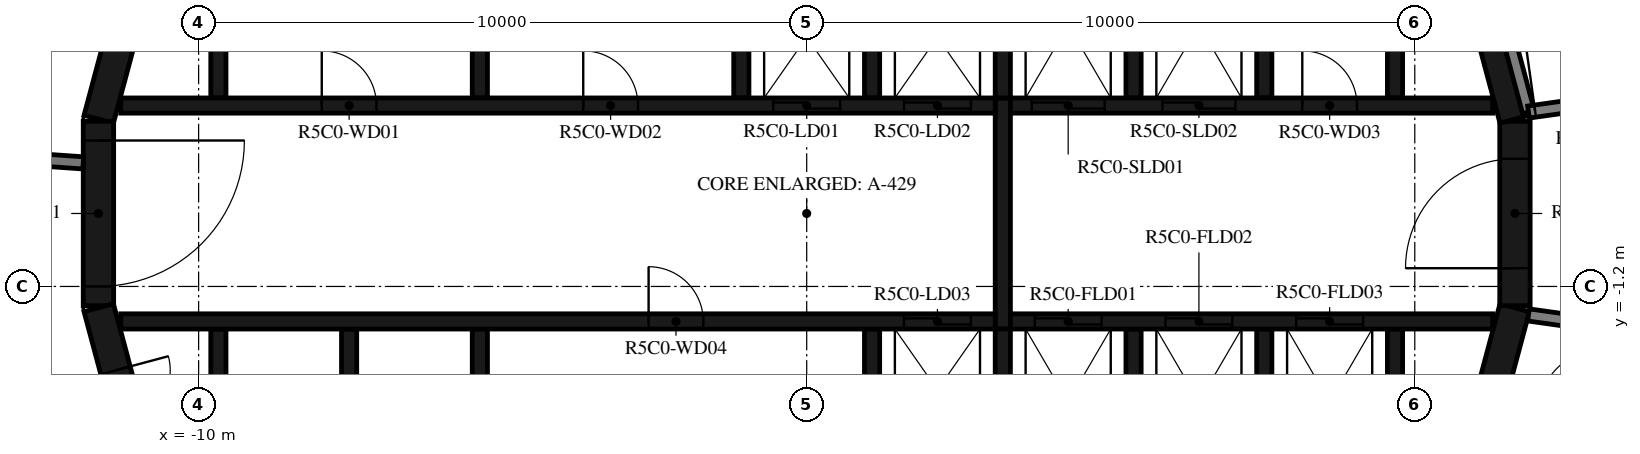
"""IFC4 building model, lengths in metres.
Left out: names, types, materials, properties, quantities, classifications, styles, units other than length and angle.
Written with IfcOpenShell. Run it as: python <this file> out.ifc"""

import sys

from ifc_helpers import new_model, si_unit, direction, frame, frame_2d, origin, place, context, subcontext, project, spatial, polyline, rectangle, outline, extrude, element, fill, save


model = new_model("IFC4")
c1 = context("Model", 3, precision=1e-05, world=origin(), true_north=direction((0.0, 1.0)))
c2 = subcontext(c1, "Body", "Model", "MODEL_VIEW")
j1 = project(units=[si_unit("LENGTHUNIT", "METRE"), si_unit("PLANEANGLEUNIT", "RADIAN")], contexts=[c1])
p1 = place(None, origin())
s1 = spatial("IfcSite", under=j1, at=p1, CompositionType="ELEMENT")
p2 = place(p1, origin())
s2 = spatial("IfcBuilding", under=s1, at=p2, CompositionType="ELEMENT")
p3 = place(p2, frame((0.0, 0.0, 216.4)))
s3 = spatial("IfcBuildingStorey", under=s2, at=p3, CompositionType="ELEMENT", Elevation=216.4)
p4 = place(p3, frame((10.858, -4.479, 0.0), z_axis=(0.0, 0.0, 1.0), x_axis=(0.258734743916, 0.965948410781, 0.0)))
e1 = element("IfcWall", 1, at=p4, inside=s3, PredefinedType="SHEAR", context=c2, shape_type="SweptSolid", body=[
    extrude(rectangle(XDim=3.033, YDim=0.5, at=frame_2d((1.516, 0.0))), origin(), (0.0, 0.0, 1.0), 3.05),
])
p5 = place(p3, frame((11.647, -1.516, 0.0), z_axis=(0.0, 0.0, 1.0), x_axis=(0.0, 1.0, 0.0)))
e2 = element("IfcWall", 2, at=p5, inside=s3, PredefinedType="SHEAR", context=c2, shape_type="SweptSolid", body=[
    extrude(rectangle(XDim=3.033, YDim=0.5, at=frame_2d((1.516, 0.0))), origin(), (0.0, 0.0, 1.0), 3.05),
])
p6 = place(p5, frame((0.616, 0.0, 0.0)))
e3 = element("IfcOpeningElement", 3, at=p6, cuts=e2, PredefinedType="OPENING", context=c2, shape_type="SweptSolid", body=[
    extrude(rectangle(XDim=1.8, YDim=2.1, at=frame_2d((0.9, 1.05))), frame((0.0, 0.26, 0.0), z_axis=(0.0, -1.0, 0.0), x_axis=(1.0, 0.0, 0.0)), (0.0, 0.0, 1.0), 0.52),
])
for number, where, z_axis, x_axis in (
    (4, (11.643, 1.55, 0.0), (0.0, 0.0, 1.0), (-0.259, 0.966, 0.0)),
    (5, (-10.858, 4.479, 0.0), (0.0, 0.0, 1.0), (-0.259, -0.966, 0.0)),
):
    element("IfcWall", number, at=place(p3, frame(where, z_axis=z_axis, x_axis=x_axis)), inside=s3, PredefinedType="SHEAR", context=c2, shape_type="SweptSolid", body=[
        extrude(rectangle(XDim=3.033, YDim=0.5, at=frame_2d((1.516, 0.0))), origin(), (0.0, 0.0, 1.0), 3.05),
    ])
p7 = place(p3, frame((-11.647, 1.516, 0.0), z_axis=(0.0, 0.0, 1.0), x_axis=(0.0, -1.0, 0.0)))
e6 = element("IfcWall", 6, at=p7, inside=s3, PredefinedType="SHEAR", context=c2, shape_type="SweptSolid", body=[
    extrude(rectangle(XDim=3.033, YDim=0.5, at=frame_2d((1.516, 0.0))), origin(), (0.0, 0.0, 1.0), 3.05),
])
p8 = place(p7, frame((0.316, 0.0, 0.0)))
e7 = element("IfcOpeningElement", 7, at=p8, cuts=e6, PredefinedType="OPENING", context=c2, shape_type="SweptSolid", body=[
    extrude(rectangle(XDim=2.4, YDim=2.1, at=frame_2d((1.2, 1.05))), frame((0.0, 0.26, 0.0), z_axis=(0.0, -1.0, 0.0), x_axis=(1.0, 0.0, 0.0)), (0.0, 0.0, 1.0), 0.52),
])
p9 = place(p3, frame((-11.643, -1.55, 0.0), z_axis=(0.0, 0.0, 1.0), x_axis=(0.258734743916, -0.965948410781, 0.0)))
e8 = element("IfcWall", 8, at=p9, inside=s3, PredefinedType="SHEAR", context=c2, shape_type="SweptSolid", body=[
    extrude(rectangle(XDim=3.033, YDim=0.5, at=frame_2d((1.516, 0.0))), origin(), (0.0, 0.0, 1.0), 3.05),
])
p10 = place(p9, frame((1.066, 0.0, 0.0)))
e9 = element("IfcOpeningElement", 9, at=p10, cuts=e8, PredefinedType="OPENING", context=c2, shape_type="SweptSolid", body=[
    extrude(rectangle(XDim=0.9, YDim=2.1, at=frame_2d((0.45, 1.05))), frame((0.0, 0.26, 0.0), z_axis=(0.0, -1.0, 0.0), x_axis=(1.0, 0.0, 0.0)), (0.0, 0.0, 1.0), 0.52),
])
p11 = place(p3, origin())
e10 = element("IfcWall", 10, at=p11, inside=s3, PredefinedType="SHEAR", context=c2, shape_type="SweptSolid", body=[
    extrude(outline(polyline([(-9.55, 4.8), (-5.5, 4.8), (-5.5, 1.9), (-5.25, 1.9), (-5.25, 4.8), (-1.2, 4.8), (-1.2, 1.9), (-0.95, 1.9), (-0.95, 4.8), (0.95, 4.8), (0.95, 1.9), (1.2, 1.9), (1.2, 4.8), (3.1, 4.8), (3.1, 1.9), (3.35, 1.9), (3.35, 4.8), (5.25, 4.8), (5.25, 1.9), (5.5, 1.9), (5.5, 4.8), (7.4, 4.8), (7.4, 1.9), (7.65, 1.9), (7.65, 4.8), (9.55, 4.8), (9.55, 1.9), (9.8, 1.9), (9.8, 4.8), (9.8, 5.05), (-9.8, 5.05), (-9.8, 4.8), (-9.8, 1.9), (-9.55, 1.9), (-9.55, 4.8)])), origin(), (0.0, 0.0, 1.0), 3.05),
])
p12 = place(p3, origin())
e11 = element("IfcWall", 11, at=p12, inside=s3, PredefinedType="SHEAR", context=c2, shape_type="SweptSolid", body=[
    extrude(outline(polyline([(9.8, -5.05), (9.8, -4.8), (9.8, -1.9), (9.55, -1.9), (9.55, -4.8), (7.65, -4.8), (7.65, -1.9), (7.4, -1.9), (7.4, -4.8), (5.5, -4.8), (5.5, -1.9), (5.25, -1.9), (5.25, -4.8), (3.35, -4.8), (3.35, -1.9), (3.1, -1.9), (3.1, -4.8), (1.2, -4.8), (1.2, -1.9), (0.95, -1.9), (0.95, -4.8), (-5.25, -4.8), (-5.25, -1.9), (-5.5, -1.9), (-5.5, -4.8), (-7.4, -4.8), (-7.4, -1.9), (-7.65, -1.9), (-7.65, -4.8), (-9.55, -4.8), (-9.55, -1.9), (-9.8, -1.9), (-9.8, -4.8), (-9.8, -5.05), (9.8, -5.05)])), origin(), (0.0, 0.0, 1.0), 3.05),
])
p13 = place(p3, frame((-11.28, 1.775, 0.0), z_axis=(0.0, 0.0, 1.0), x_axis=(1.0, 0.0, 0.0)))
e12 = element("IfcWall", 12, at=p13, inside=s3, PredefinedType="SHEAR", context=c2, shape_type="SweptSolid", body=[
    extrude(rectangle(XDim=14.38, YDim=0.25, at=frame_2d((7.19, 0.0))), origin(), (0.0, 0.0, 1.0), 3.05),
])
p14 = place(p13, frame((10.73, 0.0, 0.0)))
e13 = element("IfcOpeningElement", 13, at=p14, cuts=e12, PredefinedType="OPENING", context=c2, shape_type="SweptSolid", body=[
    extrude(rectangle(XDim=1.1, YDim=2.1, at=frame_2d((0.55, 1.05))), frame((0.0, 0.135, 0.0), z_axis=(0.0, -1.0, 0.0), x_axis=(1.0, 0.0, 0.0)), (0.0, 0.0, 1.0), 0.27),
])
p15 = place(p13, frame((12.88, 0.0, 0.0)))
e14 = element("IfcOpeningElement", 14, at=p15, cuts=e12, PredefinedType="OPENING", context=c2, shape_type="SweptSolid", body=[
    extrude(rectangle(XDim=1.1, YDim=2.1, at=frame_2d((0.55, 1.05))), frame((0.0, 0.135, 0.0), z_axis=(0.0, -1.0, 0.0), x_axis=(1.0, 0.0, 0.0)), (0.0, 0.0, 1.0), 0.27),
])
p16 = place(p13, frame((3.305, 0.0, 0.0)))
e15 = element("IfcOpeningElement", 15, at=p16, cuts=e12, PredefinedType="OPENING", context=c2, shape_type="SweptSolid", body=[
    extrude(rectangle(XDim=0.9, YDim=2.1, at=frame_2d((0.45, 1.05))), frame((0.0, 0.135, 0.0), z_axis=(0.0, -1.0, 0.0), x_axis=(1.0, 0.0, 0.0)), (0.0, 0.0, 1.0), 0.27),
])
p17 = place(p13, frame((7.605, 0.0, 0.0)))
e16 = element("IfcOpeningElement", 16, at=p17, cuts=e12, PredefinedType="OPENING", context=c2, shape_type="SweptSolid", body=[
    extrude(rectangle(XDim=0.9, YDim=2.1, at=frame_2d((0.45, 1.05))), frame((0.0, 0.135, 0.0), z_axis=(0.0, -1.0, 0.0), x_axis=(1.0, 0.0, 0.0)), (0.0, 0.0, 1.0), 0.27),
])
p18 = place(p3, frame((3.35, 1.775, 0.0), z_axis=(0.0, 0.0, 1.0), x_axis=(1.0, 0.0, 0.0)))
e17 = element("IfcWall", 17, at=p18, inside=s3, PredefinedType="SHEAR", context=c2, shape_type="SweptSolid", body=[
    extrude(rectangle(XDim=7.93, YDim=0.25, at=frame_2d((3.965, 0.0))), origin(), (0.0, 0.0, 1.0), 3.05),
])
p19 = place(p18, frame((0.35, 0.0, 0.0)))
e18 = element("IfcOpeningElement", 18, at=p19, cuts=e17, PredefinedType="OPENING", context=c2, shape_type="SweptSolid", body=[
    extrude(rectangle(XDim=1.2, YDim=2.4, at=frame_2d((0.6, 1.2))), frame((0.0, 0.135, 0.0), z_axis=(0.0, -1.0, 0.0), x_axis=(1.0, 0.0, 0.0)), (0.0, 0.0, 1.0), 0.27),
])
p20 = place(p18, frame((2.5, 0.0, 0.0)))
e19 = element("IfcOpeningElement", 19, at=p20, cuts=e17, PredefinedType="OPENING", context=c2, shape_type="SweptSolid", body=[
    extrude(rectangle(XDim=1.2, YDim=2.4, at=frame_2d((0.6, 1.2))), frame((0.0, 0.135, 0.0), z_axis=(0.0, -1.0, 0.0), x_axis=(1.0, 0.0, 0.0)), (0.0, 0.0, 1.0), 0.27),
])
p21 = place(p18, frame((4.8, 0.0, 0.0)))
e20 = element("IfcOpeningElement", 20, at=p21, cuts=e17, PredefinedType="OPENING", context=c2, shape_type="SweptSolid", body=[
    extrude(rectangle(XDim=0.9, YDim=2.1, at=frame_2d((0.45, 1.05))), frame((0.0, 0.135, 0.0), z_axis=(0.0, -1.0, 0.0), x_axis=(1.0, 0.0, 0.0)), (0.0, 0.0, 1.0), 0.27),
])
p22 = place(p3, frame((-11.28, -1.775, 0.0), z_axis=(0.0, 0.0, 1.0), x_axis=(1.0, 0.0, 0.0)))
e21 = element("IfcWall", 21, at=p22, inside=s3, PredefinedType="SHEAR", context=c2, shape_type="SweptSolid", body=[
    extrude(rectangle(XDim=14.38, YDim=0.25, at=frame_2d((7.19, 0.0))), origin(), (0.0, 0.0, 1.0), 3.05),
])
p23 = place(p22, frame((12.88, 0.0, 0.0)))
e22 = element("IfcOpeningElement", 22, at=p23, cuts=e21, PredefinedType="OPENING", context=c2, shape_type="SweptSolid", body=[
    extrude(rectangle(XDim=1.1, YDim=2.1, at=frame_2d((0.55, 1.05))), frame((0.0, 0.135, 0.0), z_axis=(0.0, -1.0, 0.0), x_axis=(1.0, 0.0, 0.0)), (0.0, 0.0, 1.0), 0.27),
])
p24 = place(p22, frame((8.68, 0.0, 0.0)))
e23 = element("IfcOpeningElement", 23, at=p24, cuts=e21, PredefinedType="OPENING", context=c2, shape_type="SweptSolid", body=[
    extrude(rectangle(XDim=0.9, YDim=2.1, at=frame_2d((0.45, 1.05))), frame((0.0, 0.135, 0.0), z_axis=(0.0, -1.0, 0.0), x_axis=(1.0, 0.0, 0.0)), (0.0, 0.0, 1.0), 0.27),
])
p25 = place(p3, frame((3.35, -1.775, 0.0), z_axis=(0.0, 0.0, 1.0), x_axis=(1.0, 0.0, 0.0)))
e24 = element("IfcWall", 24, at=p25, inside=s3, PredefinedType="SHEAR", context=c2, shape_type="SweptSolid", body=[
    extrude(rectangle(XDim=7.93, YDim=0.25, at=frame_2d((3.965, 0.0))), origin(), (0.0, 0.0, 1.0), 3.05),
])
p26 = place(p25, frame((0.4, 0.0, 0.0)))
e25 = element("IfcOpeningElement", 25, at=p26, cuts=e24, PredefinedType="OPENING", context=c2, shape_type="SweptSolid", body=[
    extrude(rectangle(XDim=1.1, YDim=2.4, at=frame_2d((0.55, 1.2))), frame((0.0, 0.135, 0.0), z_axis=(0.0, -1.0, 0.0), x_axis=(1.0, 0.0, 0.0)), (0.0, 0.0, 1.0), 0.27),
])
p27 = place(p25, frame((2.55, 0.0, 0.0)))
e26 = element("IfcOpeningElement", 26, at=p27, cuts=e24, PredefinedType="OPENING", context=c2, shape_type="SweptSolid", body=[
    extrude(rectangle(XDim=1.1, YDim=2.4, at=frame_2d((0.55, 1.2))), frame((0.0, 0.135, 0.0), z_axis=(0.0, -1.0, 0.0), x_axis=(1.0, 0.0, 0.0)), (0.0, 0.0, 1.0), 0.27),
])
p28 = place(p25, frame((4.7, 0.0, 0.0)))
e27 = element("IfcOpeningElement", 27, at=p28, cuts=e24, PredefinedType="OPENING", context=c2, shape_type="SweptSolid", body=[
    extrude(rectangle(XDim=1.1, YDim=2.4, at=frame_2d((0.55, 1.2))), frame((0.0, 0.135, 0.0), z_axis=(0.0, -1.0, 0.0), x_axis=(1.0, 0.0, 0.0)), (0.0, 0.0, 1.0), 0.27),
])
p29 = place(p3, frame((3.225, -1.9, 0.0), z_axis=(0.0, 0.0, 1.0), x_axis=(0.0, 1.0, 0.0)))
e28 = element("IfcWall", 28, at=p29, inside=s3, PredefinedType="SHEAR", context=c2, shape_type="SweptSolid", body=[
    extrude(rectangle(XDim=3.8, YDim=0.25, at=frame_2d((1.9, 0.0))), origin(), (0.0, 0.0, 1.0), 3.05),
])
p30 = place(p3, frame((11.87, 1.668, 0.0), z_axis=(0.0, 0.0, 1.0), x_axis=(-0.258836880648, 0.965921047093, 0.0)))
e29 = element("IfcWall", 29, at=p30, inside=s3, PredefinedType="STANDARD", context=c2, shape_type="SweptSolid", body=[
    extrude(rectangle(XDim=1.695, YDim=0.2, at=frame_2d((0.848, 0.0))), origin(), (0.0, 0.0, 1.0), 3.05),
])
p31 = place(p3, frame((11.87, 1.668, 0.0), z_axis=(0.0, 0.0, 1.0), x_axis=(0.990271931984, 0.139145609792, 0.0)))
e30 = element("IfcWall", 30, at=p31, inside=s3, PredefinedType="STANDARD", context=c2, shape_type="SweptSolid", body=[
    extrude(rectangle(XDim=1.712, YDim=0.2, at=frame_2d((0.856, 0.0))), origin(), (0.0, 0.0, 1.0), 3.05),
])
p32 = place(p31, frame((0.11, 0.0, 0.0)))
e31 = element("IfcOpeningElement", 31, at=p32, cuts=e30, PredefinedType="OPENING", context=c2, shape_type="SweptSolid", body=[
    extrude(rectangle(XDim=1.2, YDim=2.1, at=frame_2d((0.6, 1.05))), frame((0.0, 0.11, 0.0), z_axis=(0.0, -1.0, 0.0), x_axis=(1.0, 0.0, 0.0)), (0.0, 0.0, 1.0), 0.22),
])
p33 = place(p3, frame((13.618, 2.647, 0.0), z_axis=(0.0, 0.0, 1.0), x_axis=(-0.438366026218, 0.898796543751, 0.0)))
e32 = element("IfcWall", 32, at=p33, inside=s3, PredefinedType="STANDARD", context=c2, shape_type="SweptSolid", body=[
    extrude(rectangle(XDim=7.181, YDim=0.2, at=frame_2d((3.591, 0.0))), origin(), (0.0, 0.0, 1.0), 3.05),
])
p34 = place(p3, frame((-13.367, 0.935, 0.0), z_axis=(0.0, 0.0, 1.0), x_axis=(0.997553656289, -0.069904955655, 0.0)))
e33 = element("IfcWall", 33, at=p34, inside=s3, PredefinedType="STANDARD", context=c2, shape_type="SweptSolid", body=[
    extrude(rectangle(XDim=1.474, YDim=0.2, at=frame_2d((0.737, 0.0))), origin(), (0.0, 0.0, 1.0), 3.05),
])
p35 = place(p3, frame((13.302, -1.869, 0.0), z_axis=(0.0, 0.0, 1.0), x_axis=(-0.990274397042, 0.13912806533, 0.0)))
e34 = element("IfcWall", 34, at=p35, inside=s3, PredefinedType="STANDARD", context=c2, shape_type="SweptSolid", body=[
    extrude(rectangle(XDim=1.446, YDim=0.2, at=frame_2d((0.723, 0.0))), origin(), (0.0, 0.0, 1.0), 3.05),
])
p36 = place(p8, origin())
e35 = element("IfcDoor", 35, at=p36, inside=s3, OperationType="DOUBLE_DOOR_SINGLE_SWING", PredefinedType="DOOR", context=c2, shape_type="SweptSolid", body=[
    extrude(rectangle(XDim=2.4, YDim=2.1, at=frame_2d((1.2, 1.05))), frame((0.0, 0.025, 0.0), z_axis=(0.0, -1.0, 0.0), x_axis=(1.0, 0.0, 0.0)), (0.0, 0.0, 1.0), 0.05),
])
fill(e7, e35)
p37 = place(p6, origin())
e36 = element("IfcDoor", 36, at=p37, inside=s3, OperationType="DOUBLE_DOOR_SINGLE_SWING", PredefinedType="DOOR", context=c2, shape_type="SweptSolid", body=[
    extrude(rectangle(XDim=1.8, YDim=2.1, at=frame_2d((0.9, 1.05))), frame((0.0, 0.025, 0.0), z_axis=(0.0, -1.0, 0.0), x_axis=(1.0, 0.0, 0.0)), (0.0, 0.0, 1.0), 0.05),
])
fill(e3, e36)
p38 = place(p14, origin())
e37 = element("IfcDoor", 37, at=p38, inside=s3, OperationType="DOUBLE_DOOR_SLIDING", PredefinedType="DOOR", context=c2, shape_type="SweptSolid", body=[
    extrude(rectangle(XDim=1.1, YDim=2.1, at=frame_2d((0.55, 1.05))), frame((0.0, 0.025, 0.0), z_axis=(0.0, -1.0, 0.0), x_axis=(1.0, 0.0, 0.0)), (0.0, 0.0, 1.0), 0.05),
])
fill(e13, e37)
p39 = place(p15, origin())
e38 = element("IfcDoor", 38, at=p39, inside=s3, OperationType="DOUBLE_DOOR_SLIDING", PredefinedType="DOOR", context=c2, shape_type="SweptSolid", body=[
    extrude(rectangle(XDim=1.1, YDim=2.1, at=frame_2d((0.55, 1.05))), frame((0.0, 0.025, 0.0), z_axis=(0.0, -1.0, 0.0), x_axis=(1.0, 0.0, 0.0)), (0.0, 0.0, 1.0), 0.05),
])
fill(e14, e38)
p40 = place(p19, origin())
e39 = element("IfcDoor", 39, at=p40, inside=s3, OperationType="DOUBLE_DOOR_SLIDING", PredefinedType="DOOR", context=c2, shape_type="SweptSolid", body=[
    extrude(rectangle(XDim=1.2, YDim=2.4, at=frame_2d((0.6, 1.2))), frame((0.0, 0.025, 0.0), z_axis=(0.0, -1.0, 0.0), x_axis=(1.0, 0.0, 0.0)), (0.0, 0.0, 1.0), 0.05),
])
fill(e18, e39)
p41 = place(p20, origin())
e40 = element("IfcDoor", 40, at=p41, inside=s3, OperationType="DOUBLE_DOOR_SLIDING", PredefinedType="DOOR", context=c2, shape_type="SweptSolid", body=[
    extrude(rectangle(XDim=1.2, YDim=2.4, at=frame_2d((0.6, 1.2))), frame((0.0, 0.025, 0.0), z_axis=(0.0, -1.0, 0.0), x_axis=(1.0, 0.0, 0.0)), (0.0, 0.0, 1.0), 0.05),
])
fill(e19, e40)
p42 = place(p23, origin())
e41 = element("IfcDoor", 41, at=p42, inside=s3, OperationType="DOUBLE_DOOR_SLIDING", PredefinedType="DOOR", context=c2, shape_type="SweptSolid", body=[
    extrude(rectangle(XDim=1.1, YDim=2.1, at=frame_2d((0.55, 1.05))), frame((0.0, 0.025, 0.0), z_axis=(0.0, -1.0, 0.0), x_axis=(1.0, 0.0, 0.0)), (0.0, 0.0, 1.0), 0.05),
])
fill(e22, e41)
p43 = place(p26, origin())
e42 = element("IfcDoor", 42, at=p43, inside=s3, OperationType="DOUBLE_DOOR_SLIDING", PredefinedType="DOOR", context=c2, shape_type="SweptSolid", body=[
    extrude(rectangle(XDim=1.1, YDim=2.4, at=frame_2d((0.55, 1.2))), frame((0.0, 0.025, 0.0), z_axis=(0.0, -1.0, 0.0), x_axis=(1.0, 0.0, 0.0)), (0.0, 0.0, 1.0), 0.05),
])
fill(e25, e42)
p44 = place(p27, origin())
e43 = element("IfcDoor", 43, at=p44, inside=s3, OperationType="DOUBLE_DOOR_SLIDING", PredefinedType="DOOR", context=c2, shape_type="SweptSolid", body=[
    extrude(rectangle(XDim=1.1, YDim=2.4, at=frame_2d((0.55, 1.2))), frame((0.0, 0.025, 0.0), z_axis=(0.0, -1.0, 0.0), x_axis=(1.0, 0.0, 0.0)), (0.0, 0.0, 1.0), 0.05),
])
fill(e26, e43)
p45 = place(p28, origin())
e44 = element("IfcDoor", 44, at=p45, inside=s3, OperationType="DOUBLE_DOOR_SLIDING", PredefinedType="DOOR", context=c2, shape_type="SweptSolid", body=[
    extrude(rectangle(XDim=1.1, YDim=2.4, at=frame_2d((0.55, 1.2))), frame((0.0, 0.025, 0.0), z_axis=(0.0, -1.0, 0.0), x_axis=(1.0, 0.0, 0.0)), (0.0, 0.0, 1.0), 0.05),
])
fill(e27, e44)
p46 = place(p16, origin())
e45 = element("IfcDoor", 45, at=p46, inside=s3, OperationType="SINGLE_SWING_LEFT", PredefinedType="DOOR", context=c2, shape_type="SweptSolid", body=[
    extrude(rectangle(XDim=0.9, YDim=2.1, at=frame_2d((0.45, 1.05))), frame((0.0, 0.025, 0.0), z_axis=(0.0, -1.0, 0.0), x_axis=(1.0, 0.0, 0.0)), (0.0, 0.0, 1.0), 0.05),
])
fill(e15, e45)
p47 = place(p17, origin())
e46 = element("IfcDoor", 46, at=p47, inside=s3, OperationType="SINGLE_SWING_RIGHT", PredefinedType="DOOR", context=c2, shape_type="SweptSolid", body=[
    extrude(rectangle(XDim=0.9, YDim=2.1, at=frame_2d((0.45, 1.05))), frame((0.0, 0.025, 0.0), z_axis=(0.0, -1.0, 0.0), x_axis=(1.0, 0.0, 0.0)), (0.0, 0.0, 1.0), 0.05),
])
fill(e16, e46)
p48 = place(p21, origin())
e47 = element("IfcDoor", 47, at=p48, inside=s3, OperationType="SINGLE_SWING_LEFT", PredefinedType="DOOR", context=c2, shape_type="SweptSolid", body=[
    extrude(rectangle(XDim=0.9, YDim=2.1, at=frame_2d((0.45, 1.05))), frame((0.0, 0.025, 0.0), z_axis=(0.0, -1.0, 0.0), x_axis=(1.0, 0.0, 0.0)), (0.0, 0.0, 1.0), 0.05),
])
fill(e20, e47)
p49 = place(p24, origin())
e48 = element("IfcDoor", 48, at=p49, inside=s3, OperationType="SINGLE_SWING_RIGHT", PredefinedType="DOOR", context=c2, shape_type="SweptSolid", body=[
    extrude(rectangle(XDim=0.9, YDim=2.1, at=frame_2d((0.45, 1.05))), frame((0.0, 0.025, 0.0), z_axis=(0.0, -1.0, 0.0), x_axis=(1.0, 0.0, 0.0)), (0.0, 0.0, 1.0), 0.05),
])
fill(e23, e48)
p50 = place(p10, origin())
e49 = element("IfcDoor", 49, at=p50, inside=s3, OperationType="SINGLE_SWING_LEFT", PredefinedType="DOOR", context=c2, shape_type="SweptSolid", body=[
    extrude(rectangle(XDim=0.9, YDim=2.1, at=frame_2d((0.45, 1.05))), frame((0.0, 0.025, 0.0), z_axis=(0.0, -1.0, 0.0), x_axis=(1.0, 0.0, 0.0)), (0.0, 0.0, 1.0), 0.05),
])
fill(e9, e49)
p51 = place(p32, origin())
e50 = element("IfcDoor", 50, at=p51, inside=s3, OperationType="DOUBLE_DOOR_SINGLE_SWING", PredefinedType="DOOR", context=c2, shape_type="SweptSolid", body=[
    extrude(rectangle(XDim=1.2, YDim=2.1, at=frame_2d((0.6, 1.05))), frame((0.0, 0.025, 0.0), z_axis=(0.0, -1.0, 0.0), x_axis=(1.0, 0.0, 0.0)), (0.0, 0.0, 1.0), 0.05),
])
fill(e31, e50)
save(model, sys.argv[1])
